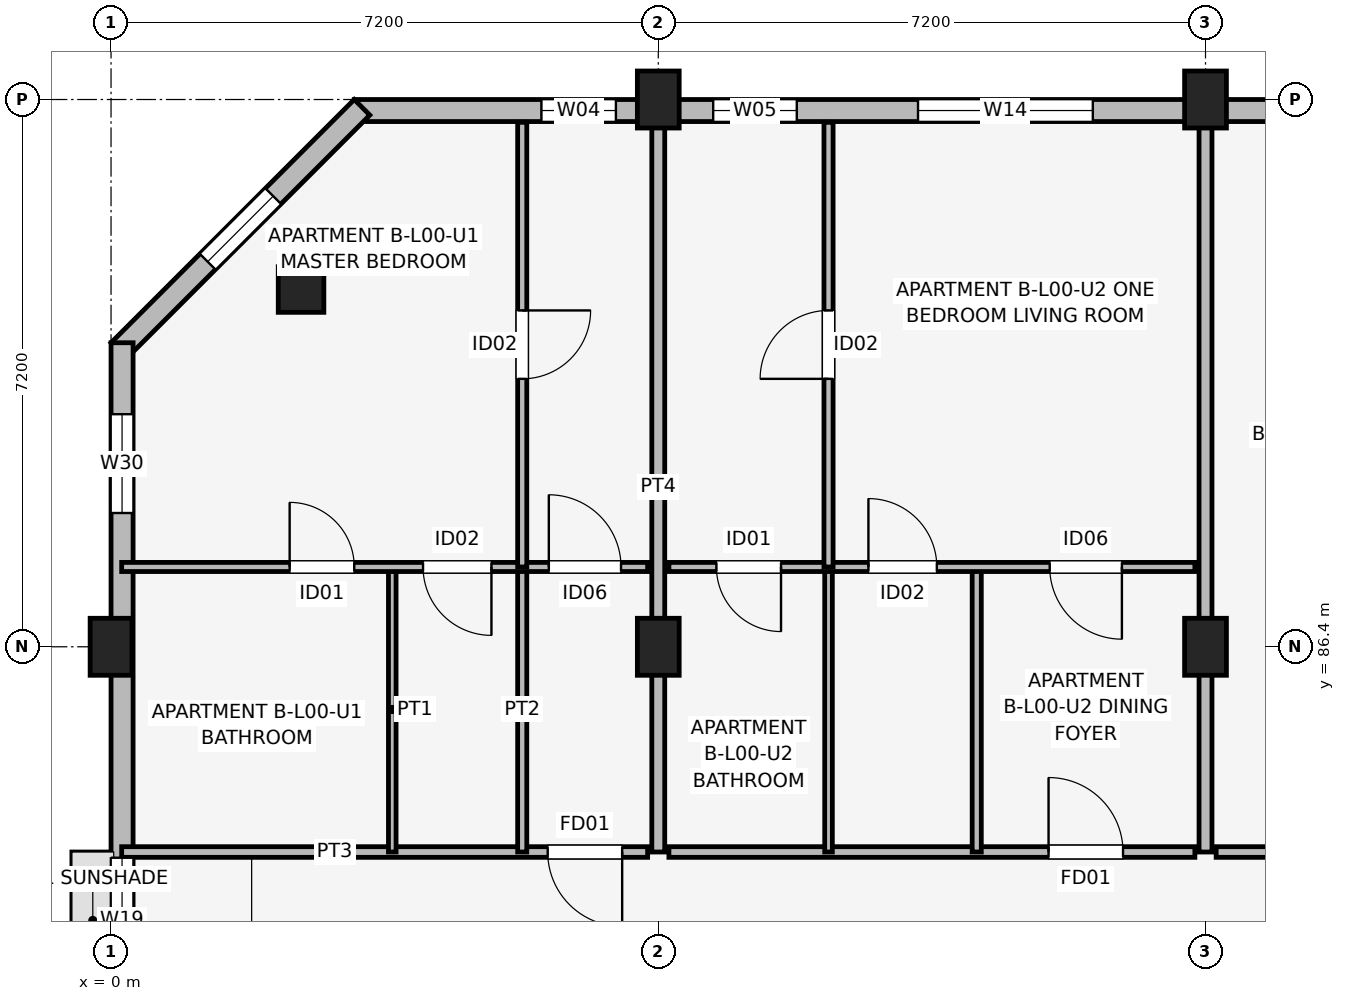
"""IFC4 building model, lengths in metres.
Left out: names, types, materials, properties, quantities, classifications, styles, units other than length and angle.
Written with IfcOpenShell. Run it as: python <this file> out.ifc"""

import sys

from ifc_helpers import new_model, si_unit, direction, frame, frame_2d, origin, origin_2d, place, context, subcontext, project, spatial, rectangle, extrude, element, fill, save


model = new_model("IFC4")
c1 = context("Model", 3, precision=1e-05, world=origin(), true_north=direction((0.0, 1.0)))
c2 = subcontext(c1, "Body", "Model", "MODEL_VIEW")
j1 = project(units=[si_unit("LENGTHUNIT", "METRE"), si_unit("PLANEANGLEUNIT", "RADIAN")], contexts=[c1])
p1 = place(None, origin())
s1 = spatial("IfcSite", under=j1, at=p1, CompositionType="ELEMENT")
p2 = place(p1, origin())
s2 = spatial("IfcBuilding", under=s1, at=p2, CompositionType="ELEMENT")
p3 = place(p2, origin())
s3 = spatial("IfcBuildingStorey", under=s2, at=p3, CompositionType="ELEMENT", Elevation=0.0)
p4 = place(p3, frame((0.0, 86.4, 0.0), z_axis=(0.0, 0.0, 1.0), x_axis=(1.0, 0.0, 0.0)))
e1 = element("IfcColumn", 1, at=p4, inside=s3, PredefinedType="COLUMN", context=c2, shape_type="SweptSolid", body=[
    extrude(rectangle(XDim=0.55, YDim=0.75, at=origin_2d()), origin(), (0.0, 0.0, 1.0), 4.5),
])
p5 = place(p3, frame((2.5, 91.1, 0.0), z_axis=(0.0, 0.0, 1.0), x_axis=(1.0, 0.0, 0.0)))
e2 = element("IfcColumn", 2, at=p5, inside=s3, PredefinedType="COLUMN", context=c2, shape_type="SweptSolid", body=[
    extrude(rectangle(XDim=0.6, YDim=0.6, at=origin_2d()), origin(), (0.0, 0.0, 1.0), 4.5),
])
for number, where, z_axis, x_axis in (
    (3, (7.2, 86.4, 0.0), (0.0, 0.0, 1.0), (1.0, 0.0, 0.0)),
    (4, (7.2, 93.6, 0.0), (0.0, 0.0, 1.0), (1.0, 0.0, 0.0)),
    (5, (14.4, 86.4, 0.0), (0.0, 0.0, 1.0), (1.0, 0.0, 0.0)),
    (6, (14.4, 93.6, 0.0), (0.0, 0.0, 1.0), (1.0, 0.0, 0.0)),
):
    element("IfcColumn", number, at=place(p3, frame(where, z_axis=z_axis, x_axis=x_axis)), inside=s3, PredefinedType="COLUMN", context=c2, shape_type="SweptSolid", body=[
        extrude(rectangle(XDim=0.55, YDim=0.75, at=origin_2d()), origin(), (0.0, 0.0, 1.0), 4.5),
    ])
p6 = place(p3, frame((32.8, 93.455, 0.0), z_axis=(0.0, 0.0, 1.0), x_axis=(-1.0, 0.0, 0.0)))
e7 = element("IfcWall", 7, at=p6, inside=s3, PredefinedType="SOLIDWALL", context=c2, shape_type="SweptSolid", body=[
    extrude(rectangle(XDim=29.6, YDim=0.29, at=frame_2d((14.8, 0.0))), origin(), (0.0, 0.0, 1.0), 3.48),
])
p7 = place(p6, frame((17.25, 0.0, 0.0), z_axis=(0.0, 0.0, 1.0), x_axis=(-1.0, 0.0, 0.0)))
e8 = element("IfcOpeningElement", 8, at=p7, cuts=e7, PredefinedType="OPENING", context=c2, shape_type="SweptSolid", body=[
    extrude(rectangle(XDim=1.8, YDim=2.4, at=frame_2d((0.9, 1.2))), frame((0.0, 0.155, 0.0), z_axis=(0.0, -1.0, 0.0), x_axis=(1.0, 0.0, 0.0)), (0.0, 0.0, 1.0), 0.31),
])
p8 = place(p6, frame((26.157, 0.0, 0.75)))
e9 = element("IfcOpeningElement", 9, at=p8, cuts=e7, PredefinedType="OPENING", context=c2, shape_type="SweptSolid", body=[
    extrude(rectangle(XDim=0.98, YDim=1.45, at=frame_2d((0.49, 0.725))), frame((0.0, 0.155, 0.0), z_axis=(0.0, -1.0, 0.0), x_axis=(1.0, 0.0, 0.0)), (0.0, 0.0, 1.0), 0.31),
])
p9 = place(p6, frame((23.778, 0.0, 0.75)))
e10 = element("IfcOpeningElement", 10, at=p9, cuts=e7, PredefinedType="OPENING", context=c2, shape_type="SweptSolid", body=[
    extrude(rectangle(XDim=1.1, YDim=1.5, at=frame_2d((0.55, 0.75))), frame((0.0, 0.155, 0.0), z_axis=(0.0, -1.0, 0.0), x_axis=(1.0, 0.0, 0.0)), (0.0, 0.0, 1.0), 0.31),
])
p10 = place(p6, frame((19.883, 0.0, 0.7)))
e11 = element("IfcOpeningElement", 11, at=p10, cuts=e7, PredefinedType="OPENING", context=c2, shape_type="SweptSolid", body=[
    extrude(rectangle(XDim=2.3, YDim=1.65, at=frame_2d((1.15, 0.825))), frame((0.0, 0.155, 0.0), z_axis=(0.0, -1.0, 0.0), x_axis=(1.0, 0.0, 0.0)), (0.0, 0.0, 1.0), 0.31),
])
p11 = place(p6, frame((6.375, 0.0, 0.7)))
e12 = element("IfcOpeningElement", 12, at=p11, cuts=e7, PredefinedType="OPENING", context=c2, shape_type="SweptSolid", body=[
    extrude(rectangle(XDim=2.45, YDim=1.65, at=frame_2d((1.225, 0.825))), frame((0.0, 0.155, 0.0), z_axis=(0.0, -1.0, 0.0), x_axis=(1.0, 0.0, 0.0)), (0.0, 0.0, 1.0), 0.31),
])
p12 = place(p6, frame((2.093, 0.0, 0.75)))
e13 = element("IfcOpeningElement", 13, at=p12, cuts=e7, PredefinedType="OPENING", context=c2, shape_type="SweptSolid", body=[
    extrude(rectangle(XDim=1.46, YDim=1.55, at=frame_2d((0.73, 0.775))), frame((0.0, 0.155, 0.0), z_axis=(0.0, -1.0, 0.0), x_axis=(1.0, 0.0, 0.0)), (0.0, 0.0, 1.0), 0.31),
])
p13 = place(p6, frame((0.755, 0.0, 0.75)))
e14 = element("IfcOpeningElement", 14, at=p13, cuts=e7, PredefinedType="OPENING", context=c2, shape_type="SweptSolid", body=[
    extrude(rectangle(XDim=0.6, YDim=1.25, at=frame_2d((0.3, 0.625))), frame((0.0, 0.155, 0.0), z_axis=(0.0, -1.0, 0.0), x_axis=(1.0, 0.0, 0.0)), (0.0, 0.0, 1.0), 0.31),
])
p14 = place(p3, frame((3.302, 93.498, 0.0), z_axis=(0.0, 0.0, 1.0), x_axis=(-0.707106781187, -0.707106781187, 0.0)))
e15 = element("IfcWall", 15, at=p14, inside=s3, PredefinedType="SOLIDWALL", context=c2, shape_type="SweptSolid", body=[
    extrude(rectangle(XDim=4.525, YDim=0.29, at=frame_2d((2.263, 0.0))), origin(), (0.0, 0.0, 1.0), 4.175),
])
p15 = place(p14, frame((1.653, 0.0, 0.85)))
e16 = element("IfcOpeningElement", 16, at=p15, cuts=e15, PredefinedType="OPENING", context=c2, shape_type="SweptSolid", body=[
    extrude(rectangle(XDim=1.22, YDim=1.5, at=frame_2d((0.61, 0.75))), frame((0.0, 0.155, 0.0), z_axis=(0.0, -1.0, 0.0), x_axis=(1.0, 0.0, 0.0)), (0.0, 0.0, 1.0), 0.31),
])
p16 = place(p3, frame((0.145, 90.4, 0.0), z_axis=(0.0, 0.0, 1.0), x_axis=(0.0, -1.0, 0.0)))
e17 = element("IfcWall", 17, at=p16, inside=s3, PredefinedType="SOLIDWALL", context=c2, shape_type="SweptSolid", body=[
    extrude(rectangle(XDim=15.2, YDim=0.29, at=frame_2d((7.6, 0.0))), origin(), (0.0, 0.0, 1.0), 3.48),
])
p17 = place(p16, frame((6.775, 0.0, 1.05)))
e18 = element("IfcOpeningElement", 18, at=p17, cuts=e17, PredefinedType="OPENING", context=c2, shape_type="SweptSolid", body=[
    extrude(rectangle(XDim=1.65, YDim=1.15, at=frame_2d((0.825, 0.575))), frame((0.0, 0.155, 0.0), z_axis=(0.0, -1.0, 0.0), x_axis=(1.0, 0.0, 0.0)), (0.0, 0.0, 1.0), 0.31),
])
p18 = place(p16, frame((0.94, 0.0, 0.75)))
e19 = element("IfcOpeningElement", 19, at=p18, cuts=e17, PredefinedType="OPENING", context=c2, shape_type="SweptSolid", body=[
    extrude(rectangle(XDim=1.3, YDim=1.55, at=frame_2d((0.65, 0.775))), frame((0.0, 0.155, 0.0), z_axis=(0.0, -1.0, 0.0), x_axis=(1.0, 0.0, 0.0)), (0.0, 0.0, 1.0), 0.31),
])
p19 = place(p3, frame((0.14, 83.7, 0.0), z_axis=(0.0, 0.0, 1.0), x_axis=(1.0, 0.0, 0.0)))
e20 = element("IfcWall", 20, at=p19, inside=s3, PredefinedType="PARTITIONING", context=c2, shape_type="SweptSolid", body=[
    extrude(rectangle(XDim=6.92, YDim=0.14, at=frame_2d((3.46, 0.0))), origin(), (0.0, 0.0, 1.0), 3.15),
])
p20 = place(p19, frame((6.585, 0.0, 0.0), z_axis=(0.0, 0.0, 1.0), x_axis=(-1.0, 0.0, 0.0)))
e21 = element("IfcOpeningElement", 21, at=p20, cuts=e20, PredefinedType="OPENING", context=c2, shape_type="SweptSolid", body=[
    extrude(rectangle(XDim=0.98, YDim=2.1, at=frame_2d((0.49, 1.05))), frame((0.0, 0.08, 0.0), z_axis=(0.0, -1.0, 0.0), x_axis=(1.0, 0.0, 0.0)), (0.0, 0.0, 1.0), 0.16),
])
p21 = place(p3, frame((3.7, 83.7, 0.0), z_axis=(0.0, 0.0, 1.0), x_axis=(0.0, 1.0, 0.0)))
e22 = element("IfcWall", 22, at=p21, inside=s3, PredefinedType="PARTITIONING", context=c2, shape_type="SweptSolid", body=[
    extrude(rectangle(XDim=3.75, YDim=0.1, at=frame_2d((1.875, 0.0))), origin(), (0.0, 0.0, 1.0), 3.15),
])
p22 = place(p3, frame((5.41, 83.7, 0.0), z_axis=(0.0, 0.0, 1.0), x_axis=(0.0, 1.0, 0.0)))
e23 = element("IfcWall", 23, at=p22, inside=s3, PredefinedType="PARTITIONING", context=c2, shape_type="SweptSolid", body=[
    extrude(rectangle(XDim=3.75, YDim=0.12, at=frame_2d((1.875, 0.0))), origin(), (0.0, 0.0, 1.0), 3.15),
])
p23 = place(p3, frame((0.14, 87.45, 0.0), z_axis=(0.0, 0.0, 1.0), x_axis=(1.0, 0.0, 0.0)))
e24 = element("IfcWall", 24, at=p23, inside=s3, PredefinedType="PARTITIONING", context=c2, shape_type="SweptSolid", body=[
    extrude(rectangle(XDim=6.92, YDim=0.12, at=frame_2d((3.46, 0.0))), origin(), (0.0, 0.0, 1.0), 3.15),
])
p24 = place(p23, frame((2.21, 0.0, 0.0)))
e25 = element("IfcOpeningElement", 25, at=p24, cuts=e24, PredefinedType="OPENING", context=c2, shape_type="SweptSolid", body=[
    extrude(rectangle(XDim=0.85, YDim=2.08, at=frame_2d((0.425, 1.04))), frame((0.0, 0.07, 0.0), z_axis=(0.0, -1.0, 0.0), x_axis=(1.0, 0.0, 0.0)), (0.0, 0.0, 1.0), 0.14),
])
p25 = place(p23, frame((4.865, 0.0, 0.0), z_axis=(0.0, 0.0, 1.0), x_axis=(-1.0, 0.0, 0.0)))
e26 = element("IfcOpeningElement", 26, at=p25, cuts=e24, PredefinedType="OPENING", context=c2, shape_type="SweptSolid", body=[
    extrude(rectangle(XDim=0.9, YDim=2.08, at=frame_2d((0.45, 1.04))), frame((0.0, 0.07, 0.0), z_axis=(0.0, -1.0, 0.0), x_axis=(1.0, 0.0, 0.0)), (0.0, 0.0, 1.0), 0.14),
])
p26 = place(p23, frame((5.62, 0.0, 0.0)))
e27 = element("IfcOpeningElement", 27, at=p26, cuts=e24, PredefinedType="OPENING", context=c2, shape_type="SweptSolid", body=[
    extrude(rectangle(XDim=0.95, YDim=2.08, at=frame_2d((0.475, 1.04))), frame((0.0, 0.07, 0.0), z_axis=(0.0, -1.0, 0.0), x_axis=(1.0, 0.0, 0.0)), (0.0, 0.0, 1.0), 0.14),
])
p27 = place(p3, frame((5.41, 87.45, 0.0), z_axis=(0.0, 0.0, 1.0), x_axis=(0.0, 1.0, 0.0)))
e28 = element("IfcWall", 28, at=p27, inside=s3, PredefinedType="PARTITIONING", context=c2, shape_type="SweptSolid", body=[
    extrude(rectangle(XDim=5.85, YDim=0.12, at=frame_2d((2.925, 0.0))), origin(), (0.0, 0.0, 1.0), 3.15),
])
p28 = place(p27, frame((3.375, 0.0, 0.0), z_axis=(0.0, 0.0, 1.0), x_axis=(-1.0, 0.0, 0.0)))
e29 = element("IfcOpeningElement", 29, at=p28, cuts=e28, PredefinedType="OPENING", context=c2, shape_type="SweptSolid", body=[
    extrude(rectangle(XDim=0.9, YDim=2.08, at=frame_2d((0.45, 1.04))), frame((0.0, 0.07, 0.0), z_axis=(0.0, -1.0, 0.0), x_axis=(1.0, 0.0, 0.0)), (0.0, 0.0, 1.0), 0.14),
])
p29 = place(p3, frame((7.2, 83.7, 0.0), z_axis=(0.0, 0.0, 1.0), x_axis=(0.0, 1.0, 0.0)))
e30 = element("IfcWall", 30, at=p29, inside=s3, PredefinedType="PARTITIONING", context=c2, shape_type="SweptSolid", body=[
    extrude(rectangle(XDim=9.6, YDim=0.17, at=frame_2d((4.8, 0.0))), origin(), (0.0, 0.0, 1.0), 3.15),
])
p30 = place(p3, frame((7.34, 83.7, 0.0), z_axis=(0.0, 0.0, 1.0), x_axis=(1.0, 0.0, 0.0)))
e31 = element("IfcWall", 31, at=p30, inside=s3, PredefinedType="PARTITIONING", context=c2, shape_type="SweptSolid", body=[
    extrude(rectangle(XDim=6.92, YDim=0.14, at=frame_2d((3.46, 0.0))), origin(), (0.0, 0.0, 1.0), 3.15),
])
p31 = place(p30, frame((4.995, 0.0, 0.0)))
e32 = element("IfcOpeningElement", 32, at=p31, cuts=e31, PredefinedType="OPENING", context=c2, shape_type="SweptSolid", body=[
    extrude(rectangle(XDim=0.98, YDim=2.1, at=frame_2d((0.49, 1.05))), frame((0.0, 0.08, 0.0), z_axis=(0.0, -1.0, 0.0), x_axis=(1.0, 0.0, 0.0)), (0.0, 0.0, 1.0), 0.16),
])
p32 = place(p3, frame((9.44, 83.7, 0.0), z_axis=(0.0, 0.0, 1.0), x_axis=(0.0, 1.0, 0.0)))
e33 = element("IfcWall", 33, at=p32, inside=s3, PredefinedType="PARTITIONING", context=c2, shape_type="SweptSolid", body=[
    extrude(rectangle(XDim=3.75, YDim=0.1, at=frame_2d((1.875, 0.0))), origin(), (0.0, 0.0, 1.0), 3.15),
])
p33 = place(p3, frame((11.39, 83.7, 0.0), z_axis=(0.0, 0.0, 1.0), x_axis=(0.0, 1.0, 0.0)))
e34 = element("IfcWall", 34, at=p33, inside=s3, PredefinedType="PARTITIONING", context=c2, shape_type="SweptSolid", body=[
    extrude(rectangle(XDim=3.75, YDim=0.12, at=frame_2d((1.875, 0.0))), origin(), (0.0, 0.0, 1.0), 3.15),
])
p34 = place(p3, frame((7.34, 87.45, 0.0), z_axis=(0.0, 0.0, 1.0), x_axis=(1.0, 0.0, 0.0)))
e35 = element("IfcWall", 35, at=p34, inside=s3, PredefinedType="PARTITIONING", context=c2, shape_type="SweptSolid", body=[
    extrude(rectangle(XDim=6.92, YDim=0.12, at=frame_2d((3.46, 0.0))), origin(), (0.0, 0.0, 1.0), 3.15),
])
p35 = place(p34, frame((1.475, 0.0, 0.0), z_axis=(0.0, 0.0, 1.0), x_axis=(-1.0, 0.0, 0.0)))
e36 = element("IfcOpeningElement", 36, at=p35, cuts=e35, PredefinedType="OPENING", context=c2, shape_type="SweptSolid", body=[
    extrude(rectangle(XDim=0.85, YDim=2.08, at=frame_2d((0.425, 1.04))), frame((0.0, 0.07, 0.0), z_axis=(0.0, -1.0, 0.0), x_axis=(1.0, 0.0, 0.0)), (0.0, 0.0, 1.0), 0.14),
])
p36 = place(p34, frame((2.625, 0.0, 0.0)))
e37 = element("IfcOpeningElement", 37, at=p36, cuts=e35, PredefinedType="OPENING", context=c2, shape_type="SweptSolid", body=[
    extrude(rectangle(XDim=0.9, YDim=2.08, at=frame_2d((0.45, 1.04))), frame((0.0, 0.07, 0.0), z_axis=(0.0, -1.0, 0.0), x_axis=(1.0, 0.0, 0.0)), (0.0, 0.0, 1.0), 0.14),
])
p37 = place(p34, frame((5.96, 0.0, 0.0), z_axis=(0.0, 0.0, 1.0), x_axis=(-1.0, 0.0, 0.0)))
e38 = element("IfcOpeningElement", 38, at=p37, cuts=e35, PredefinedType="OPENING", context=c2, shape_type="SweptSolid", body=[
    extrude(rectangle(XDim=0.95, YDim=2.08, at=frame_2d((0.475, 1.04))), frame((0.0, 0.07, 0.0), z_axis=(0.0, -1.0, 0.0), x_axis=(1.0, 0.0, 0.0)), (0.0, 0.0, 1.0), 0.14),
])
p38 = place(p3, frame((9.44, 87.45, 0.0), z_axis=(0.0, 0.0, 1.0), x_axis=(0.0, 1.0, 0.0)))
e39 = element("IfcWall", 39, at=p38, inside=s3, PredefinedType="PARTITIONING", context=c2, shape_type="SweptSolid", body=[
    extrude(rectangle(XDim=5.85, YDim=0.12, at=frame_2d((2.925, 0.0))), origin(), (0.0, 0.0, 1.0), 3.15),
])
p39 = place(p38, frame((2.475, 0.0, 0.0)))
e40 = element("IfcOpeningElement", 40, at=p39, cuts=e39, PredefinedType="OPENING", context=c2, shape_type="SweptSolid", body=[
    extrude(rectangle(XDim=0.9, YDim=2.08, at=frame_2d((0.45, 1.04))), frame((0.0, 0.07, 0.0), z_axis=(0.0, -1.0, 0.0), x_axis=(1.0, 0.0, 0.0)), (0.0, 0.0, 1.0), 0.14),
])
p40 = place(p3, frame((14.4, 83.7, 0.0), z_axis=(0.0, 0.0, 1.0), x_axis=(0.0, 1.0, 0.0)))
e41 = element("IfcWall", 41, at=p40, inside=s3, PredefinedType="PARTITIONING", context=c2, shape_type="SweptSolid", body=[
    extrude(rectangle(XDim=9.6, YDim=0.17, at=frame_2d((4.8, 0.0))), origin(), (0.0, 0.0, 1.0), 3.15),
])
p41 = place(p3, frame((14.54, 83.7, 0.0), z_axis=(0.0, 0.0, 1.0), x_axis=(1.0, 0.0, 0.0)))
e42 = element("IfcWall", 42, at=p41, inside=s3, PredefinedType="PARTITIONING", context=c2, shape_type="SweptSolid", body=[
    extrude(rectangle(XDim=6.92, YDim=0.14, at=frame_2d((3.46, 0.0))), origin(), (0.0, 0.0, 1.0), 3.15),
])
p42 = place(p41, frame((1.25, 0.0, 0.0)))
e43 = element("IfcOpeningElement", 43, at=p42, cuts=e42, PredefinedType="OPENING", context=c2, shape_type="SweptSolid", body=[
    extrude(rectangle(XDim=1.4, YDim=2.22, at=frame_2d((0.7, 1.11))), frame((0.0, 0.08, 0.0), z_axis=(0.0, -1.0, 0.0), x_axis=(1.0, 0.0, 0.0)), (0.0, 0.0, 1.0), 0.16),
])
p43 = place(p41, frame((6.07, 0.0, 0.0), z_axis=(0.0, 0.0, 1.0), x_axis=(-1.0, 0.0, 0.0)))
e44 = element("IfcOpeningElement", 44, at=p43, cuts=e42, PredefinedType="OPENING", context=c2, shape_type="SweptSolid", body=[
    extrude(rectangle(XDim=1.0, YDim=2.12, at=frame_2d((0.5, 1.06))), frame((0.0, 0.08, 0.0), z_axis=(0.0, -1.0, 0.0), x_axis=(1.0, 0.0, 0.0)), (0.0, 0.0, 1.0), 0.16),
])
p44 = place(p15, origin())
e45 = element("IfcWindow", 45, at=p44, inside=s3, PartitioningType="SINGLE_PANEL", PredefinedType="WINDOW", context=c2, shape_type="SweptSolid", body=[
    extrude(rectangle(XDim=1.22, YDim=1.5, at=frame_2d((0.61, 0.75))), frame((0.0, 0.03, 0.0), z_axis=(0.0, -1.0, 0.0), x_axis=(1.0, 0.0, 0.0)), (0.0, 0.0, 1.0), 0.06),
])
fill(e16, e45)
p45 = place(p8, origin())
e46 = element("IfcWindow", 46, at=p45, inside=s3, PartitioningType="SINGLE_PANEL", PredefinedType="WINDOW", context=c2, shape_type="SweptSolid", body=[
    extrude(rectangle(XDim=0.98, YDim=1.45, at=frame_2d((0.49, 0.725))), frame((0.0, 0.03, 0.0), z_axis=(0.0, -1.0, 0.0), x_axis=(1.0, 0.0, 0.0)), (0.0, 0.0, 1.0), 0.06),
])
fill(e9, e46)
p46 = place(p9, origin())
e47 = element("IfcWindow", 47, at=p46, inside=s3, PartitioningType="SINGLE_PANEL", PredefinedType="WINDOW", context=c2, shape_type="SweptSolid", body=[
    extrude(rectangle(XDim=1.1, YDim=1.5, at=frame_2d((0.55, 0.75))), frame((0.0, 0.03, 0.0), z_axis=(0.0, -1.0, 0.0), x_axis=(1.0, 0.0, 0.0)), (0.0, 0.0, 1.0), 0.06),
])
fill(e10, e47)
p47 = place(p10, origin())
e48 = element("IfcWindow", 48, at=p47, inside=s3, PartitioningType="SINGLE_PANEL", PredefinedType="WINDOW", context=c2, shape_type="SweptSolid", body=[
    extrude(rectangle(XDim=2.3, YDim=1.65, at=frame_2d((1.15, 0.825))), frame((0.0, 0.03, 0.0), z_axis=(0.0, -1.0, 0.0), x_axis=(1.0, 0.0, 0.0)), (0.0, 0.0, 1.0), 0.06),
])
fill(e11, e48)
p48 = place(p17, origin())
e49 = element("IfcWindow", 49, at=p48, inside=s3, PartitioningType="SINGLE_PANEL", PredefinedType="WINDOW", context=c2, shape_type="SweptSolid", body=[
    extrude(rectangle(XDim=1.65, YDim=1.15, at=frame_2d((0.825, 0.575))), frame((0.0, 0.03, 0.0), z_axis=(0.0, -1.0, 0.0), x_axis=(1.0, 0.0, 0.0)), (0.0, 0.0, 1.0), 0.06),
])
fill(e18, e49)
p49 = place(p18, origin())
e50 = element("IfcWindow", 50, at=p49, inside=s3, PartitioningType="SINGLE_PANEL", PredefinedType="WINDOW", context=c2, shape_type="SweptSolid", body=[
    extrude(rectangle(XDim=1.3, YDim=1.55, at=frame_2d((0.65, 0.775))), frame((0.0, 0.03, 0.0), z_axis=(0.0, -1.0, 0.0), x_axis=(1.0, 0.0, 0.0)), (0.0, 0.0, 1.0), 0.06),
])
fill(e19, e50)
p50 = place(p20, origin())
e51 = element("IfcDoor", 51, at=p50, inside=s3, OperationType="SINGLE_SWING_RIGHT", PredefinedType="DOOR", context=c2, shape_type="SweptSolid", body=[
    extrude(rectangle(XDim=0.98, YDim=2.1, at=frame_2d((0.49, 1.05))), frame((0.0, 0.025, 0.0), z_axis=(0.0, -1.0, 0.0), x_axis=(1.0, 0.0, 0.0)), (0.0, 0.0, 1.0), 0.05),
])
fill(e21, e51)
p51 = place(p24, origin())
e52 = element("IfcDoor", 52, at=p51, inside=s3, OperationType="SINGLE_SWING_LEFT", PredefinedType="DOOR", context=c2, shape_type="SweptSolid", body=[
    extrude(rectangle(XDim=0.85, YDim=2.08, at=frame_2d((0.425, 1.04))), frame((0.0, 0.025, 0.0), z_axis=(0.0, -1.0, 0.0), x_axis=(1.0, 0.0, 0.0)), (0.0, 0.0, 1.0), 0.05),
])
fill(e25, e52)
p52 = place(p25, origin())
e53 = element("IfcDoor", 53, at=p52, inside=s3, OperationType="SINGLE_SWING_RIGHT", PredefinedType="DOOR", context=c2, shape_type="SweptSolid", body=[
    extrude(rectangle(XDim=0.9, YDim=2.08, at=frame_2d((0.45, 1.04))), frame((0.0, 0.025, 0.0), z_axis=(0.0, -1.0, 0.0), x_axis=(1.0, 0.0, 0.0)), (0.0, 0.0, 1.0), 0.05),
])
fill(e26, e53)
p53 = place(p26, origin())
e54 = element("IfcDoor", 54, at=p53, inside=s3, OperationType="SINGLE_SWING_LEFT", PredefinedType="DOOR", context=c2, shape_type="SweptSolid", body=[
    extrude(rectangle(XDim=0.95, YDim=2.08, at=frame_2d((0.475, 1.04))), frame((0.0, 0.025, 0.0), z_axis=(0.0, -1.0, 0.0), x_axis=(1.0, 0.0, 0.0)), (0.0, 0.0, 1.0), 0.05),
])
fill(e27, e54)
p54 = place(p28, origin())
e55 = element("IfcDoor", 55, at=p54, inside=s3, OperationType="SINGLE_SWING_RIGHT", PredefinedType="DOOR", context=c2, shape_type="SweptSolid", body=[
    extrude(rectangle(XDim=0.9, YDim=2.08, at=frame_2d((0.45, 1.04))), frame((0.0, 0.025, 0.0), z_axis=(0.0, -1.0, 0.0), x_axis=(1.0, 0.0, 0.0)), (0.0, 0.0, 1.0), 0.05),
])
fill(e29, e55)
p55 = place(p31, origin())
e56 = element("IfcDoor", 56, at=p55, inside=s3, OperationType="SINGLE_SWING_LEFT", PredefinedType="DOOR", context=c2, shape_type="SweptSolid", body=[
    extrude(rectangle(XDim=0.98, YDim=2.1, at=frame_2d((0.49, 1.05))), frame((0.0, 0.025, 0.0), z_axis=(0.0, -1.0, 0.0), x_axis=(1.0, 0.0, 0.0)), (0.0, 0.0, 1.0), 0.05),
])
fill(e32, e56)
p56 = place(p35, origin())
e57 = element("IfcDoor", 57, at=p56, inside=s3, OperationType="SINGLE_SWING_RIGHT", PredefinedType="DOOR", context=c2, shape_type="SweptSolid", body=[
    extrude(rectangle(XDim=0.85, YDim=2.08, at=frame_2d((0.425, 1.04))), frame((0.0, 0.025, 0.0), z_axis=(0.0, -1.0, 0.0), x_axis=(1.0, 0.0, 0.0)), (0.0, 0.0, 1.0), 0.05),
])
fill(e36, e57)
p57 = place(p36, origin())
e58 = element("IfcDoor", 58, at=p57, inside=s3, OperationType="SINGLE_SWING_LEFT", PredefinedType="DOOR", context=c2, shape_type="SweptSolid", body=[
    extrude(rectangle(XDim=0.9, YDim=2.08, at=frame_2d((0.45, 1.04))), frame((0.0, 0.025, 0.0), z_axis=(0.0, -1.0, 0.0), x_axis=(1.0, 0.0, 0.0)), (0.0, 0.0, 1.0), 0.05),
])
fill(e37, e58)
p58 = place(p37, origin())
e59 = element("IfcDoor", 59, at=p58, inside=s3, OperationType="SINGLE_SWING_RIGHT", PredefinedType="DOOR", context=c2, shape_type="SweptSolid", body=[
    extrude(rectangle(XDim=0.95, YDim=2.08, at=frame_2d((0.475, 1.04))), frame((0.0, 0.025, 0.0), z_axis=(0.0, -1.0, 0.0), x_axis=(1.0, 0.0, 0.0)), (0.0, 0.0, 1.0), 0.05),
])
fill(e38, e59)
p59 = place(p39, origin())
e60 = element("IfcDoor", 60, at=p59, inside=s3, OperationType="SINGLE_SWING_LEFT", PredefinedType="DOOR", context=c2, shape_type="SweptSolid", body=[
    extrude(rectangle(XDim=0.9, YDim=2.08, at=frame_2d((0.45, 1.04))), frame((0.0, 0.025, 0.0), z_axis=(0.0, -1.0, 0.0), x_axis=(1.0, 0.0, 0.0)), (0.0, 0.0, 1.0), 0.05),
])
fill(e40, e60)
save(model, sys.argv[1])
